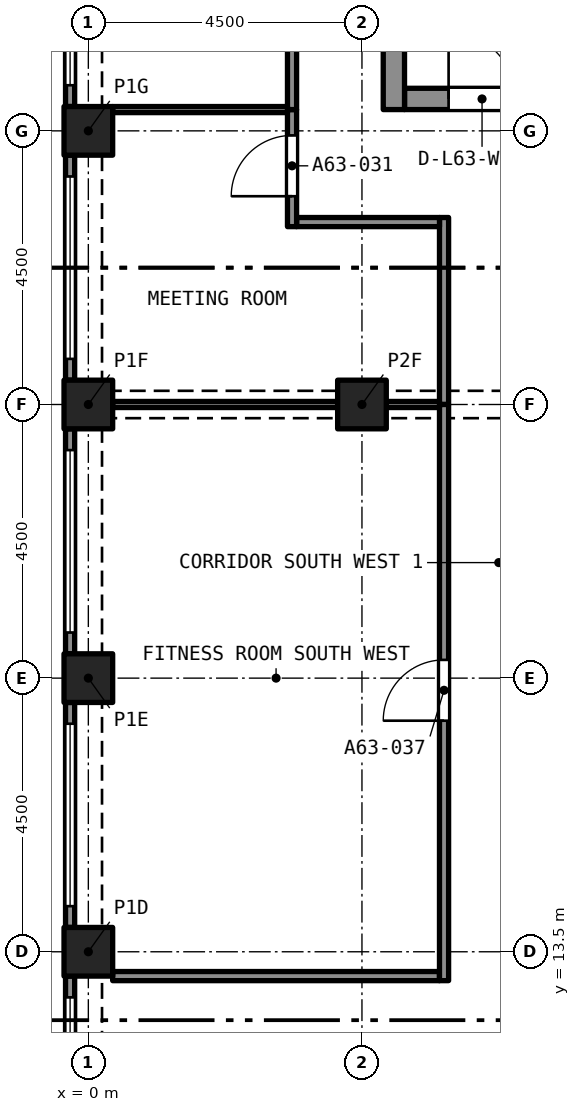
"""IFC4 building model, lengths in metres.
Left out: names, types, materials, properties, quantities, classifications, styles, units other than length and angle.
Written with IfcOpenShell. Run it as: python <this file> out.ifc"""

import sys

from ifc_helpers import new_model, si_unit, direction, frame, frame_2d, origin, origin_2d, place, context, subcontext, project, spatial, rectangle, extrude, element, fill, save


model = new_model("IFC4")
c1 = context("Model", 3, precision=1e-05, world=origin(), true_north=direction((0.0, 1.0)))
c2 = subcontext(c1, "Body", "Model", "MODEL_VIEW")
j1 = project(units=[si_unit("LENGTHUNIT", "METRE"), si_unit("PLANEANGLEUNIT", "RADIAN")], contexts=[c1])
p1 = place(None, origin())
s1 = spatial("IfcSite", under=j1, at=p1, CompositionType="ELEMENT")
p2 = place(p1, origin())
s2 = spatial("IfcBuilding", under=s1, at=p2, CompositionType="ELEMENT")
p3 = place(p2, frame((0.0, 0.0, 226.095)))
s3 = spatial("IfcBuildingStorey", under=s2, at=p3, CompositionType="ELEMENT", Elevation=226.095)
for number, where, z_axis, x_axis in (
    (1, (0.0, 13.5, 0.0), (0.0, 0.0, 1.0), (1.0, 0.0, 0.0)),
    (2, (0.0, 18.0, 0.0), (0.0, 0.0, 1.0), (1.0, 0.0, 0.0)),
    (3, (0.0, 22.5, 0.0), (0.0, 0.0, 1.0), (1.0, 0.0, 0.0)),
    (4, (4.5, 22.5, 0.0), (0.0, 0.0, 1.0), (1.0, 0.0, 0.0)),
    (5, (0.0, 27.0, 0.0), (0.0, 0.0, 1.0), (1.0, 0.0, 0.0)),
):
    element("IfcColumn", number, at=place(p3, frame(where, z_axis=z_axis, x_axis=x_axis)), inside=s3, PredefinedType="COLUMN", context=c2, shape_type="SweptSolid", body=[
        extrude(rectangle(XDim=0.8, YDim=0.8, at=origin_2d()), origin(), (0.0, 0.0, 1.0), 3.2),
    ])
p4 = place(p3, frame((5.2, 27.525, 0.0), z_axis=(0.0, 0.0, 1.0), x_axis=(1.0, 0.0, 0.0)))
e6 = element("IfcWall", 6, at=p4, inside=s3, PredefinedType="SOLIDWALL", context=c2, shape_type="SweptSolid", body=[
    extrude(rectangle(XDim=7.6, YDim=0.35, at=frame_2d((3.8, 0.0))), origin(), (0.0, 0.0, 1.0), 3.2),
])
p5 = place(p4, frame((0.725, 0.0, 0.0)))
e7 = element("IfcOpeningElement", 7, at=p5, cuts=e6, PredefinedType="OPENING", context=c2, shape_type="SweptSolid", body=[
    extrude(rectangle(XDim=1.1, YDim=2.1, at=frame_2d((0.55, 1.05))), frame((0.0, 0.185, 0.0), z_axis=(0.0, -1.0, 0.0), x_axis=(1.0, 0.0, 0.0)), (0.0, 0.0, 1.0), 0.37),
])
p6 = place(p4, frame((3.25, 0.0, 0.0)))
e8 = element("IfcOpeningElement", 8, at=p6, cuts=e6, PredefinedType="OPENING", context=c2, shape_type="SweptSolid", body=[
    extrude(rectangle(XDim=1.1, YDim=2.1, at=frame_2d((0.55, 1.05))), frame((0.0, 0.185, 0.0), z_axis=(0.0, -1.0, 0.0), x_axis=(1.0, 0.0, 0.0)), (0.0, 0.0, 1.0), 0.37),
])
p7 = place(p4, frame((5.775, 0.0, 0.0)))
e9 = element("IfcOpeningElement", 9, at=p7, cuts=e6, PredefinedType="OPENING", context=c2, shape_type="SweptSolid", body=[
    extrude(rectangle(XDim=1.1, YDim=2.1, at=frame_2d((0.55, 1.05))), frame((0.0, 0.185, 0.0), z_axis=(0.0, -1.0, 0.0), x_axis=(1.0, 0.0, 0.0)), (0.0, 0.0, 1.0), 0.37),
])
p8 = place(p3, frame((5.025, 27.35, 0.0), z_axis=(0.0, 0.0, 1.0), x_axis=(0.0, 1.0, 0.0)))
e10 = element("IfcWall", 10, at=p8, inside=s3, PredefinedType="SOLIDWALL", context=c2, shape_type="SweptSolid", body=[
    extrude(rectangle(XDim=12.8, YDim=0.35, at=frame_2d((6.4, 0.0))), origin(), (0.0, 0.0, 1.0), 3.2),
])
p9 = place(p8, frame((8.6, 0.0, 0.0)))
e11 = element("IfcOpeningElement", 11, at=p9, cuts=e10, PredefinedType="OPENING", context=c2, shape_type="SweptSolid", body=[
    extrude(rectangle(XDim=1.2, YDim=2.1, at=frame_2d((0.6, 1.05))), frame((0.0, 0.185, 0.0), z_axis=(0.0, -1.0, 0.0), x_axis=(1.0, 0.0, 0.0)), (0.0, 0.0, 1.0), 0.37),
])
p10 = place(p3, frame((-0.3, 27.4, 0.0), z_axis=(0.0, 0.0, 1.0), x_axis=(0.0, 1.0, 0.0)))
e12 = element("IfcWall", 12, at=p10, inside=s3, PredefinedType="SOLIDWALL", context=c2, shape_type="SweptSolid", body=[
    extrude(rectangle(XDim=3.7, YDim=0.15, at=frame_2d((1.85, 0.0))), origin(), (0.0, 0.0, 1.0), 3.2),
])
p11 = place(p10, frame((0.35, 0.0, 0.45)))
e13 = element("IfcOpeningElement", 13, at=p11, cuts=e12, PredefinedType="OPENING", context=c2, shape_type="SweptSolid", body=[
    extrude(rectangle(XDim=3.0, YDim=1.95, at=frame_2d((1.5, 0.975))), frame((0.0, 0.085, 0.0), z_axis=(0.0, -1.0, 0.0), x_axis=(1.0, 0.0, 0.0)), (0.0, 0.0, 1.0), 0.17),
])
p12 = place(p3, frame((-0.3, 22.9, 0.0), z_axis=(0.0, 0.0, 1.0), x_axis=(0.0, 1.0, 0.0)))
e14 = element("IfcWall", 14, at=p12, inside=s3, PredefinedType="SOLIDWALL", context=c2, shape_type="SweptSolid", body=[
    extrude(rectangle(XDim=3.7, YDim=0.15, at=frame_2d((1.85, 0.0))), origin(), (0.0, 0.0, 1.0), 3.2),
])
p13 = place(p12, frame((0.35, 0.0, 0.45)))
e15 = element("IfcOpeningElement", 15, at=p13, cuts=e14, PredefinedType="OPENING", context=c2, shape_type="SweptSolid", body=[
    extrude(rectangle(XDim=3.0, YDim=1.95, at=frame_2d((1.5, 0.975))), frame((0.0, 0.085, 0.0), z_axis=(0.0, -1.0, 0.0), x_axis=(1.0, 0.0, 0.0)), (0.0, 0.0, 1.0), 0.17),
])
p14 = place(p3, frame((-0.3, 18.4, 0.0), z_axis=(0.0, 0.0, 1.0), x_axis=(0.0, 1.0, 0.0)))
e16 = element("IfcWall", 16, at=p14, inside=s3, PredefinedType="SOLIDWALL", context=c2, shape_type="SweptSolid", body=[
    extrude(rectangle(XDim=3.7, YDim=0.15, at=frame_2d((1.85, 0.0))), origin(), (0.0, 0.0, 1.0), 3.2),
])
p15 = place(p14, frame((0.35, 0.0, 0.45)))
e17 = element("IfcOpeningElement", 17, at=p15, cuts=e16, PredefinedType="OPENING", context=c2, shape_type="SweptSolid", body=[
    extrude(rectangle(XDim=3.0, YDim=1.95, at=frame_2d((1.5, 0.975))), frame((0.0, 0.085, 0.0), z_axis=(0.0, -1.0, 0.0), x_axis=(1.0, 0.0, 0.0)), (0.0, 0.0, 1.0), 0.17),
])
p16 = place(p3, frame((-0.3, 13.9, 0.0), z_axis=(0.0, 0.0, 1.0), x_axis=(0.0, 1.0, 0.0)))
e18 = element("IfcWall", 18, at=p16, inside=s3, PredefinedType="SOLIDWALL", context=c2, shape_type="SweptSolid", body=[
    extrude(rectangle(XDim=3.7, YDim=0.15, at=frame_2d((1.85, 0.0))), origin(), (0.0, 0.0, 1.0), 3.2),
])
p17 = place(p16, frame((0.35, 0.0, 0.45)))
e19 = element("IfcOpeningElement", 19, at=p17, cuts=e18, PredefinedType="OPENING", context=c2, shape_type="SweptSolid", body=[
    extrude(rectangle(XDim=3.0, YDim=1.95, at=frame_2d((1.5, 0.975))), frame((0.0, 0.085, 0.0), z_axis=(0.0, -1.0, 0.0), x_axis=(1.0, 0.0, 0.0)), (0.0, 0.0, 1.0), 0.17),
])
p18 = place(p3, frame((-0.3, 9.4, 0.0), z_axis=(0.0, 0.0, 1.0), x_axis=(0.0, 1.0, 0.0)))
e20 = element("IfcWall", 20, at=p18, inside=s3, PredefinedType="SOLIDWALL", context=c2, shape_type="SweptSolid", body=[
    extrude(rectangle(XDim=3.7, YDim=0.15, at=frame_2d((1.85, 0.0))), origin(), (0.0, 0.0, 1.0), 3.2),
])
p19 = place(p18, frame((0.35, 0.0, 0.45)))
e21 = element("IfcOpeningElement", 21, at=p19, cuts=e20, PredefinedType="OPENING", context=c2, shape_type="SweptSolid", body=[
    extrude(rectangle(XDim=3.0, YDim=1.95, at=frame_2d((1.5, 0.975))), frame((0.0, 0.085, 0.0), z_axis=(0.0, -1.0, 0.0), x_axis=(1.0, 0.0, 0.0)), (0.0, 0.0, 1.0), 0.17),
])
p20 = place(p3, frame((0.4, 13.1, 0.0), z_axis=(0.0, 0.0, 1.0), x_axis=(1.0, 0.0, 0.0)))
e22 = element("IfcWall", 22, at=p20, inside=s3, PredefinedType="PARTITIONING", context=c2, shape_type="SweptSolid", body=[
    extrude(rectangle(XDim=5.375, YDim=0.15, at=frame_2d((2.688, 0.0))), origin(), (0.0, 0.0, 1.0), 2.9),
])
p21 = place(p3, frame((5.85, 22.5, 0.0), z_axis=(0.0, 0.0, 1.0), x_axis=(0.0, 1.0, 0.0)))
e23 = element("IfcWall", 23, at=p21, inside=s3, PredefinedType="PARTITIONING", context=c2, shape_type="SweptSolid", body=[
    extrude(rectangle(XDim=3.075, YDim=0.15, at=frame_2d((1.538, 0.0))), origin(), (0.0, 0.0, 1.0), 2.9),
])
p22 = place(p3, frame((3.425, 25.5, 0.0), z_axis=(0.0, 0.0, 1.0), x_axis=(1.0, 0.0, 0.0)))
e24 = element("IfcWall", 24, at=p22, inside=s3, PredefinedType="PARTITIONING", context=c2, shape_type="SweptSolid", body=[
    extrude(rectangle(XDim=2.35, YDim=0.15, at=frame_2d((1.175, 0.0))), origin(), (0.0, 0.0, 1.0), 2.9),
])
p23 = place(p3, frame((3.35, 25.425, 0.0), z_axis=(0.0, 0.0, 1.0), x_axis=(0.0, 1.0, 0.0)))
e25 = element("IfcWall", 25, at=p23, inside=s3, PredefinedType="PARTITIONING", context=c2, shape_type="SweptSolid", body=[
    extrude(rectangle(XDim=1.925, YDim=0.15, at=frame_2d((0.962, 0.0))), origin(), (0.0, 0.0, 1.0), 2.9),
])
p24 = place(p23, frame((0.5, 0.0, 0.0)))
e26 = element("IfcOpeningElement", 26, at=p24, cuts=e25, PredefinedType="OPENING", context=c2, shape_type="SweptSolid", body=[
    extrude(rectangle(XDim=1.0, YDim=2.1, at=frame_2d((0.5, 1.05))), frame((0.0, 0.085, 0.0), z_axis=(0.0, -1.0, 0.0), x_axis=(1.0, 0.0, 0.0)), (0.0, 0.0, 1.0), 0.17),
])
p25 = place(p3, frame((3.35, 27.35, 0.0), z_axis=(0.0, 0.0, 1.0), x_axis=(0.0, 1.0, 0.0)))
e27 = element("IfcWall", 27, at=p25, inside=s3, PredefinedType="PARTITIONING", context=c2, shape_type="SweptSolid", body=[
    extrude(rectangle(XDim=4.15, YDim=0.15, at=frame_2d((2.075, 0.0))), origin(), (0.0, 0.0, 1.0), 2.9),
])
p26 = place(p25, frame((1.575, 0.0, 0.0)))
e28 = element("IfcOpeningElement", 28, at=p26, cuts=e27, PredefinedType="OPENING", context=c2, shape_type="SweptSolid", body=[
    extrude(rectangle(XDim=1.0, YDim=2.1, at=frame_2d((0.5, 1.05))), frame((0.0, 0.085, 0.0), z_axis=(0.0, -1.0, 0.0), x_axis=(1.0, 0.0, 0.0)), (0.0, 0.0, 1.0), 0.17),
])
p27 = place(p3, frame((5.85, 13.025, 0.0), z_axis=(0.0, 0.0, 1.0), x_axis=(0.0, 1.0, 0.0)))
e29 = element("IfcWall", 29, at=p27, inside=s3, PredefinedType="PARTITIONING", context=c2, shape_type="SweptSolid", body=[
    extrude(rectangle(XDim=9.475, YDim=0.15, at=frame_2d((4.738, 0.0))), origin(), (0.0, 0.0, 1.0), 2.9),
])
p28 = place(p27, frame((4.275, 0.0, 0.0)))
e30 = element("IfcOpeningElement", 30, at=p28, cuts=e29, PredefinedType="OPENING", context=c2, shape_type="SweptSolid", body=[
    extrude(rectangle(XDim=1.0, YDim=2.1, at=frame_2d((0.5, 1.05))), frame((0.0, 0.085, 0.0), z_axis=(0.0, -1.0, 0.0), x_axis=(1.0, 0.0, 0.0)), (0.0, 0.0, 1.0), 0.17),
])
p29 = place(p3, frame((0.4, 27.35, 0.0), z_axis=(0.0, 0.0, 1.0), x_axis=(1.0, 0.0, 0.0)))
e31 = element("IfcWall", 31, at=p29, inside=s3, PredefinedType="PARTITIONING", context=c2, shape_type="SweptSolid", body=[
    extrude(rectangle(XDim=2.875, YDim=0.1, at=frame_2d((1.438, 0.0))), origin(), (0.0, 0.0, 1.0), 2.9),
])
p30 = place(p3, frame((4.9, 22.5, 0.0), z_axis=(0.0, 0.0, 1.0), x_axis=(1.0, 0.0, 0.0)))
e32 = element("IfcWall", 32, at=p30, inside=s3, PredefinedType="PARTITIONING", context=c2, shape_type="SweptSolid", body=[
    extrude(rectangle(XDim=0.875, YDim=0.1, at=frame_2d((0.438, 0.0))), origin(), (0.0, 0.0, 1.0), 2.38),
])
p31 = place(p3, frame((0.4, 22.5, 0.0), z_axis=(0.0, 0.0, 1.0), x_axis=(1.0, 0.0, 0.0)))
e33 = element("IfcWall", 33, at=p31, inside=s3, PredefinedType="PARTITIONING", context=c2, shape_type="SweptSolid", body=[
    extrude(rectangle(XDim=3.7, YDim=0.1, at=frame_2d((1.85, 0.0))), origin(), (0.0, 0.0, 1.0), 2.38),
])
p32 = place(p11, origin())
e34 = element("IfcWindow", 34, at=p32, inside=s3, PartitioningType="SINGLE_PANEL", PredefinedType="WINDOW", context=c2, shape_type="SweptSolid", body=[
    extrude(rectangle(XDim=3.0, YDim=1.95, at=frame_2d((1.5, 0.975))), frame((0.0, 0.03, 0.0), z_axis=(0.0, -1.0, 0.0), x_axis=(1.0, 0.0, 0.0)), (0.0, 0.0, 1.0), 0.06),
])
fill(e13, e34)
p33 = place(p13, origin())
e35 = element("IfcWindow", 35, at=p33, inside=s3, PartitioningType="SINGLE_PANEL", PredefinedType="WINDOW", context=c2, shape_type="SweptSolid", body=[
    extrude(rectangle(XDim=3.0, YDim=1.95, at=frame_2d((1.5, 0.975))), frame((0.0, 0.03, 0.0), z_axis=(0.0, -1.0, 0.0), x_axis=(1.0, 0.0, 0.0)), (0.0, 0.0, 1.0), 0.06),
])
fill(e15, e35)
p34 = place(p15, origin())
e36 = element("IfcWindow", 36, at=p34, inside=s3, PartitioningType="SINGLE_PANEL", PredefinedType="WINDOW", context=c2, shape_type="SweptSolid", body=[
    extrude(rectangle(XDim=3.0, YDim=1.95, at=frame_2d((1.5, 0.975))), frame((0.0, 0.03, 0.0), z_axis=(0.0, -1.0, 0.0), x_axis=(1.0, 0.0, 0.0)), (0.0, 0.0, 1.0), 0.06),
])
fill(e17, e36)
p35 = place(p17, origin())
e37 = element("IfcWindow", 37, at=p35, inside=s3, PartitioningType="SINGLE_PANEL", PredefinedType="WINDOW", context=c2, shape_type="SweptSolid", body=[
    extrude(rectangle(XDim=3.0, YDim=1.95, at=frame_2d((1.5, 0.975))), frame((0.0, 0.03, 0.0), z_axis=(0.0, -1.0, 0.0), x_axis=(1.0, 0.0, 0.0)), (0.0, 0.0, 1.0), 0.06),
])
fill(e19, e37)
p36 = place(p19, origin())
e38 = element("IfcWindow", 38, at=p36, inside=s3, PartitioningType="SINGLE_PANEL", PredefinedType="WINDOW", context=c2, shape_type="SweptSolid", body=[
    extrude(rectangle(XDim=3.0, YDim=1.95, at=frame_2d((1.5, 0.975))), frame((0.0, 0.03, 0.0), z_axis=(0.0, -1.0, 0.0), x_axis=(1.0, 0.0, 0.0)), (0.0, 0.0, 1.0), 0.06),
])
fill(e21, e38)
p37 = place(p24, origin())
e39 = element("IfcDoor", 39, at=p37, inside=s3, OperationType="SINGLE_SWING_RIGHT", PredefinedType="DOOR", context=c2, shape_type="SweptSolid", body=[
    extrude(rectangle(XDim=1.0, YDim=2.1, at=frame_2d((0.5, 1.05))), frame((0.0, 0.025, 0.0), z_axis=(0.0, -1.0, 0.0), x_axis=(1.0, 0.0, 0.0)), (0.0, 0.0, 1.0), 0.05),
])
fill(e26, e39)
p38 = place(p28, origin())
e40 = element("IfcDoor", 40, at=p38, inside=s3, OperationType="SINGLE_SWING_RIGHT", PredefinedType="DOOR", context=c2, shape_type="SweptSolid", body=[
    extrude(rectangle(XDim=1.0, YDim=2.1, at=frame_2d((0.5, 1.05))), frame((0.0, 0.025, 0.0), z_axis=(0.0, -1.0, 0.0), x_axis=(1.0, 0.0, 0.0)), (0.0, 0.0, 1.0), 0.05),
])
fill(e30, e40)
p39 = place(p5, origin())
e41 = element("IfcDoor", 41, at=p39, inside=s3, OperationType="SINGLE_SWING_LEFT", PredefinedType="DOOR", context=c2, shape_type="SweptSolid", body=[
    extrude(rectangle(XDim=1.1, YDim=2.1, at=frame_2d((0.55, 1.05))), frame((0.0, 0.025, 0.0), z_axis=(0.0, -1.0, 0.0), x_axis=(1.0, 0.0, 0.0)), (0.0, 0.0, 1.0), 0.05),
])
fill(e7, e41)
save(model, sys.argv[1])
